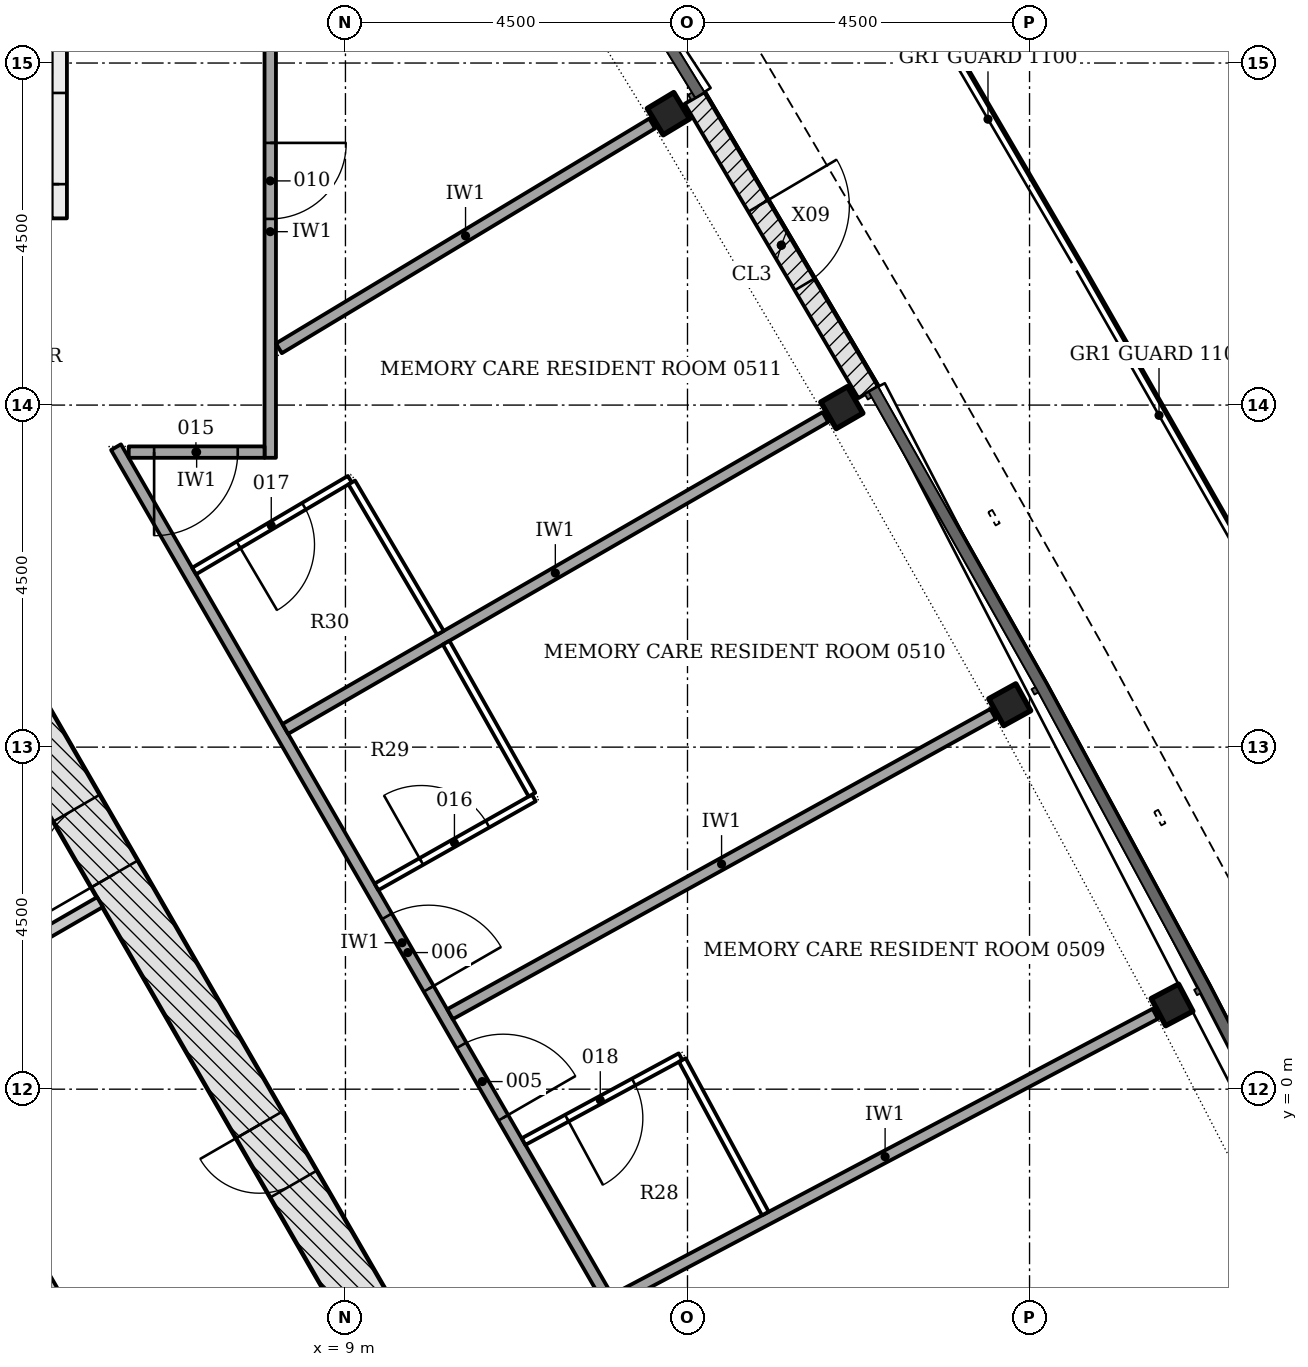
"""IFC4 building model, lengths in metres.
Left out: names, types, materials, properties, quantities, classifications, styles, units other than length and angle.
Written with IfcOpenShell. Run it as: python <this file> out.ifc"""

import sys

from ifc_helpers import new_model, si_unit, direction, frame, frame_2d, origin, origin_2d, place, context, subcontext, project, spatial, rectangle, i_section, extrude, element, fill, save


model = new_model("IFC4")
c1 = context("Model", 3, precision=1e-05, world=origin(), true_north=direction((0.0, 1.0)))
c2 = subcontext(c1, "Body", "Model", "MODEL_VIEW")
j1 = project(units=[si_unit("LENGTHUNIT", "METRE"), si_unit("PLANEANGLEUNIT", "RADIAN")], contexts=[c1])
p1 = place(None, origin())
s1 = spatial("IfcSite", under=j1, at=p1, CompositionType="ELEMENT")
p2 = place(p1, origin())
s2 = spatial("IfcBuilding", under=s1, at=p2, CompositionType="ELEMENT")
p3 = place(p2, frame((0.0, 0.0, 24.0)))
s3 = spatial("IfcBuildingStorey", under=s2, at=p3, CompositionType="ELEMENT", Elevation=24.0)
p4 = place(p3, frame((10.311, -4.703, -0.2), z_axis=(0.0, 0.0, 1.0), x_axis=(-0.500001446645, 0.866024568562, 0.0)))
e1 = element("IfcWall", 1, at=p4, inside=s3, PredefinedType="SHEAR", context=c2, shape_type="SweptSolid", body=[
    extrude(rectangle(XDim=18.458, YDim=0.7, at=frame_2d((9.229, 0.0))), origin(), (0.0, 0.0, 1.0), 3.6),
])
p5 = place(p4, frame((8.7, 0.0, 0.2)))
e2 = element("IfcOpeningElement", 2, at=p5, cuts=e1, PredefinedType="OPENING", context=c2, shape_type="SweptSolid", body=[
    extrude(rectangle(XDim=1.0, YDim=2.1, at=frame_2d((0.5, 1.05))), frame((0.0, 0.36, 0.0), z_axis=(0.0, -1.0, 0.0), x_axis=(1.0, 0.0, 0.0)), (0.0, 0.0, 1.0), 0.72),
])
p6 = place(p4, frame((3.99, 0.0, 0.2)))
e3 = element("IfcOpeningElement", 3, at=p6, cuts=e1, PredefinedType="OPENING", context=c2, shape_type="SweptSolid", body=[
    extrude(rectangle(XDim=0.9, YDim=2.1, at=frame_2d((0.45, 1.05))), frame((0.0, 0.36, 0.0), z_axis=(0.0, -1.0, 0.0), x_axis=(1.0, 0.0, 0.0)), (0.0, 0.0, 1.0), 0.72),
])
p7 = place(p4, frame((13.539, 0.0, 0.2)))
e4 = element("IfcOpeningElement", 4, at=p7, cuts=e1, PredefinedType="OPENING", context=c2, shape_type="SweptSolid", body=[
    extrude(rectangle(XDim=0.9, YDim=2.1, at=frame_2d((0.45, 1.05))), frame((0.0, 0.36, 0.0), z_axis=(0.0, -1.0, 0.0), x_axis=(1.0, 0.0, 0.0)), (0.0, 0.0, 1.0), 0.72),
])
for number, where, z_axis, x_axis in (
    (5, (19.875, 1.108, -0.2), (0.0, 0.0, 1.0), (-0.468, 0.884, 0.0)),
    (6, (17.739, 5.058, -0.2), (0.0, 0.0, 1.0), (-0.484, 0.875, 0.0)),
    (7, (15.531, 8.967, -0.2), (0.0, 0.0, 1.0), (-0.5, 0.866, 0.0)),
    (8, (13.25, 12.834, -0.2), (0.0, 0.0, 1.0), (-0.516, 0.857, 0.0)),
):
    element("IfcColumn", number, at=place(p3, frame(where, z_axis=z_axis, x_axis=x_axis)), inside=s3, PredefinedType="COLUMN", context=c2, shape_type="SweptSolid", body=[
        extrude(i_section(OverallWidth=0.404, OverallDepth=0.406, WebThickness=0.027, FlangeThickness=0.044, FilletRadius=0.015, at=origin_2d()), origin(), (0.0, 0.0, 1.0), 3.6),
    ])
p8 = place(p3, frame((13.593, 13.04, 0.0), z_axis=(0.0, 0.0, 1.0), x_axis=(0.507980887805, -0.861368340273, 0.0)))
e9 = element("IfcWall", 9, at=p8, inside=s3, PredefinedType="NOTDEFINED", context=c2, shape_type="SweptSolid", body=[
    extrude(rectangle(XDim=4.496, YDim=0.3, at=frame_2d((2.248, 0.0))), origin(), (0.0, 0.0, 1.0), 3.3),
])
p9 = place(p8, frame((1.648, 0.0, 0.0)))
e10 = element("IfcOpeningElement", 10, at=p9, cuts=e9, PredefinedType="OPENING", context=c2, shape_type="SweptSolid", body=[
    extrude(rectangle(XDim=1.2, YDim=2.4, at=frame_2d((0.6, 1.2))), frame((0.0, 0.16, 0.0), z_axis=(0.0, -1.0, 0.0), x_axis=(1.0, 0.0, 0.0)), (0.0, 0.0, 1.0), 0.32),
])
p10 = place(p3, frame((-4.404, -3.413, 0.0), z_axis=(0.0, 0.0, 1.0), x_axis=(0.866022252853, 0.500005457533, 0.0)))
e11 = element("IfcWall", 11, at=p10, inside=s3, PredefinedType="PARTITIONING", context=c2, shape_type="SweptSolid", body=[
    extrude(rectangle(XDim=11.749, YDim=0.15, at=frame_2d((5.875, 0.0))), origin(), (0.0, 0.0, 1.0), 3.4),
])
p11 = place(p10, frame((3.875, 0.0, 0.0)))
e12 = element("IfcOpeningElement", 12, at=p11, cuts=e11, PredefinedType="OPENING", context=c2, shape_type="SweptSolid", body=[
    extrude(rectangle(XDim=0.9, YDim=2.1, at=frame_2d((0.45, 1.05))), frame((0.0, 0.085, 0.0), z_axis=(0.0, -1.0, 0.0), x_axis=(1.0, 0.0, 0.0)), (0.0, 0.0, 1.0), 0.17),
])
p12 = place(p3, frame((5.598, -3.439, 0.0), z_axis=(0.0, 0.0, 1.0), x_axis=(-0.500007155043, 0.866021272779, 0.0)))
e13 = element("IfcWall", 13, at=p12, inside=s3, PredefinedType="PARTITIONING", context=c2, shape_type="SweptSolid", body=[
    extrude(rectangle(XDim=4.949, YDim=0.15, at=frame_2d((2.474, 0.0))), origin(), (0.0, 0.0, 1.0), 3.4),
])
p13 = place(p3, frame((5.236, 11.456, -0.2), z_axis=(0.0, 0.0, 1.0), x_axis=(0.0, 1.0, 0.0)))
e14 = element("IfcWall", 14, at=p13, inside=s3, PredefinedType="SHEAR", context=c2, shape_type="SweptSolid", body=[
    extrude(rectangle(XDim=5.6, YDim=0.2, at=frame_2d((2.8, 0.0))), origin(), (0.0, 0.0, 1.0), 3.6),
])
p14 = place(p13, frame((0.45, 0.0, 0.2)))
e15 = element("IfcOpeningElement", 15, at=p14, cuts=e14, PredefinedType="OPENING", context=c2, shape_type="SweptSolid", body=[
    extrude(rectangle(XDim=1.2, YDim=2.1, at=frame_2d((0.6, 1.05))), frame((0.0, 0.11, 0.0), z_axis=(0.0, -1.0, 0.0), x_axis=(1.0, 0.0, 0.0)), (0.0, 0.0, 1.0), 0.22),
])
p15 = place(p3, frame((5.981, 8.446, 0.0), z_axis=(0.0, 0.0, 1.0), x_axis=(0.499996620721, -0.866027354803, 0.0)))
e16 = element("IfcWall", 16, at=p15, inside=s3, PredefinedType="PARTITIONING", context=c2, shape_type="SweptSolid", body=[
    extrude(rectangle(XDim=15.057, YDim=0.15, at=frame_2d((7.528, 0.0))), origin(), (0.0, 0.0, 1.0), 2.768),
])
p16 = place(p15, frame((9.087, 0.0, 0.0)))
e17 = element("IfcOpeningElement", 17, at=p16, cuts=e16, PredefinedType="OPENING", context=c2, shape_type="SweptSolid", body=[
    extrude(rectangle(XDim=1.1, YDim=2.1, at=frame_2d((0.55, 1.05))), frame((0.0, 0.085, 0.0), z_axis=(0.0, -1.0, 0.0), x_axis=(1.0, 0.0, 0.0)), (0.0, 0.0, 1.0), 0.17),
])
p17 = place(p15, frame((7.128, 0.0, 0.0)))
e18 = element("IfcOpeningElement", 18, at=p17, cuts=e16, PredefinedType="OPENING", context=c2, shape_type="SweptSolid", body=[
    extrude(rectangle(XDim=1.1, YDim=2.1, at=frame_2d((0.55, 1.05))), frame((0.0, 0.085, 0.0), z_axis=(0.0, -1.0, 0.0), x_axis=(1.0, 0.0, 0.0)), (0.0, 0.0, 1.0), 0.17),
])
p18 = place(p3, frame((8.01, 14.256, 0.0), z_axis=(0.0, 0.0, 1.0), x_axis=(0.0, -1.0, 0.0)))
e19 = element("IfcWall", 19, at=p18, inside=s3, PredefinedType="PARTITIONING", context=c2, shape_type="SweptSolid", body=[
    extrude(rectangle(XDim=5.95, YDim=0.15, at=frame_2d((2.975, 0.0))), origin(), (0.0, 0.0, 1.0), 2.768),
])
p19 = place(p18, frame((1.807, 0.0, 0.0)))
e20 = element("IfcOpeningElement", 20, at=p19, cuts=e19, PredefinedType="OPENING", context=c2, shape_type="SweptSolid", body=[
    extrude(rectangle(XDim=1.0, YDim=2.1, at=frame_2d((0.5, 1.05))), frame((0.0, 0.085, 0.0), z_axis=(0.0, -1.0, 0.0), x_axis=(1.0, 0.0, 0.0)), (0.0, 0.0, 1.0), 0.17),
])
p20 = place(p3, frame((7.936, 8.381, 0.0), z_axis=(0.0, 0.0, 1.0), x_axis=(-1.0, 0.0, 0.0)))
e21 = element("IfcWall", 21, at=p20, inside=s3, PredefinedType="PARTITIONING", context=c2, shape_type="SweptSolid", body=[
    extrude(rectangle(XDim=1.787, YDim=0.15, at=frame_2d((0.894, 0.0))), origin(), (0.0, 0.0, 1.0), 2.768),
])
p21 = place(p20, frame((0.353, 0.0, 0.0)))
e22 = element("IfcOpeningElement", 22, at=p21, cuts=e21, PredefinedType="OPENING", context=c2, shape_type="SweptSolid", body=[
    extrude(rectangle(XDim=1.1, YDim=2.1, at=frame_2d((0.55, 1.05))), frame((0.0, 0.085, 0.0), z_axis=(0.0, -1.0, 0.0), x_axis=(1.0, 0.0, 0.0)), (0.0, 0.0, 1.0), 0.17),
])
p22 = place(p3, frame((15.314, 8.842, 0.0), z_axis=(0.0, 0.0, 1.0), x_axis=(-0.866015124653, -0.500017803555, 0.0)))
e23 = element("IfcWall", 23, at=p22, inside=s3, PredefinedType="PARTITIONING", context=c2, shape_type="SweptSolid", body=[
    extrude(rectangle(XDim=8.205, YDim=0.15, at=frame_2d((4.103, 0.0))), origin(), (0.0, 0.0, 1.0), 2.768),
])
p23 = place(p3, frame((17.521, 4.937, 0.0), z_axis=(0.0, 0.0, 1.0), x_axis=(-0.875148563779, -0.483854307944, 0.0)))
e24 = element("IfcWall", 24, at=p23, inside=s3, PredefinedType="PARTITIONING", context=c2, shape_type="SweptSolid", body=[
    extrude(rectangle(XDim=8.164, YDim=0.15, at=frame_2d((4.082, 0.0))), origin(), (0.0, 0.0, 1.0), 2.768),
])
p24 = place(p3, frame((19.654, 0.992, 0.0), z_axis=(0.0, 0.0, 1.0), x_axis=(-0.883980590433, -0.467523599124, 0.0)))
e25 = element("IfcWall", 25, at=p24, inside=s3, PredefinedType="PARTITIONING", context=c2, shape_type="SweptSolid", body=[
    extrude(rectangle(XDim=8.041, YDim=0.15, at=frame_2d((4.021, 0.0))), origin(), (0.0, 0.0, 1.0), 2.768),
])
p25 = place(p3, frame((13.036, 12.705, 0.0), z_axis=(0.0, 0.0, 1.0), x_axis=(-0.856612490534, -0.515960309579, 0.0)))
e26 = element("IfcWall", 26, at=p25, inside=s3, PredefinedType="PARTITIONING", context=c2, shape_type="SweptSolid", body=[
    extrude(rectangle(XDim=5.733, YDim=0.15, at=frame_2d((2.867, 0.0))), origin(), (0.0, 0.0, 1.0), 2.768),
])
p26 = place(p3, frame((9.408, 2.662, 0.0), z_axis=(0.0, 0.0, 1.0), x_axis=(0.870608725809, 0.491976062981, 0.0)))
e27 = element("IfcWall", 27, at=p26, inside=s3, PredefinedType="PARTITIONING", context=c2, shape_type="SweptSolid", body=[
    extrude(rectangle(XDim=2.378, YDim=0.1, at=frame_2d((1.189, 0.0))), origin(), (0.0, 0.0, 1.0), 3.4),
])
p27 = place(p26, frame((0.678, 0.0, 0.0)))
e28 = element("IfcOpeningElement", 28, at=p27, cuts=e27, PredefinedType="OPENING", context=c2, shape_type="SweptSolid", body=[
    extrude(rectangle(XDim=1.0, YDim=2.1, at=frame_2d((0.5, 1.05))), frame((0.0, 0.06, 0.0), z_axis=(0.0, -1.0, 0.0), x_axis=(1.0, 0.0, 0.0)), (0.0, 0.0, 1.0), 0.12),
])
p28 = place(p3, frame((9.058, 8.025, 0.0), z_axis=(0.0, 0.0, 1.0), x_axis=(-0.861363599661, -0.507988926236, 0.0)))
e29 = element("IfcWall", 29, at=p28, inside=s3, PredefinedType="PARTITIONING", context=c2, shape_type="SweptSolid", body=[
    extrude(rectangle(XDim=2.378, YDim=0.1, at=frame_2d((1.189, 0.0))), origin(), (0.0, 0.0, 1.0), 3.4),
])
p29 = place(p28, frame((0.7, 0.0, 0.0)))
e30 = element("IfcOpeningElement", 30, at=p29, cuts=e29, PredefinedType="OPENING", context=c2, shape_type="SweptSolid", body=[
    extrude(rectangle(XDim=1.0, YDim=2.1, at=frame_2d((0.5, 1.05))), frame((0.0, 0.06, 0.0), z_axis=(0.0, -1.0, 0.0), x_axis=(1.0, 0.0, 0.0)), (0.0, 0.0, 1.0), 0.12),
])
p30 = place(p3, frame((13.408, 0.427, 0.0), z_axis=(0.0, 0.0, 1.0), x_axis=(-0.879611235398, -0.475693256797, 0.0)))
e31 = element("IfcWall", 31, at=p30, inside=s3, PredefinedType="PARTITIONING", context=c2, shape_type="SweptSolid", body=[
    extrude(rectangle(XDim=2.347, YDim=0.1, at=frame_2d((1.173, 0.0))), origin(), (0.0, 0.0, 1.0), 3.4),
])
p31 = place(p30, frame((0.7, 0.0, 0.0)))
e32 = element("IfcOpeningElement", 32, at=p31, cuts=e31, PredefinedType="OPENING", context=c2, shape_type="SweptSolid", body=[
    extrude(rectangle(XDim=1.0, YDim=2.1, at=frame_2d((0.5, 1.05))), frame((0.0, 0.06, 0.0), z_axis=(0.0, -1.0, 0.0), x_axis=(1.0, 0.0, 0.0)), (0.0, 0.0, 1.0), 0.12),
])
for number, where, z_axis, x_axis in (
    (33, (14.524, -1.636, 0.0), (0.0, 0.0, 1.0), (-0.476, 0.88, 0.0)),
    (34, (10.325, 5.874, 0.0), (0.0, 0.0, 1.0), (0.492, -0.871, 0.0)),
    (35, (10.249, 6.004, 0.0), (0.0, 0.0, 1.0), (-0.508, 0.861, 0.0)),
):
    element("IfcWall", number, at=place(p3, frame(where, z_axis=z_axis, x_axis=x_axis)), inside=s3, PredefinedType="PARTITIONING", context=c2, shape_type="SweptSolid", body=[
        extrude(rectangle(XDim=2.296, YDim=0.1, at=frame_2d((1.148, 0.0))), origin(), (0.0, 0.0, 1.0), 2.768),
    ])
p32 = place(p9, origin())
e36 = element("IfcDoor", 36, at=p32, inside=s3, OperationType="SINGLE_SWING_LEFT", PredefinedType="DOOR", context=c2, shape_type="SweptSolid", body=[
    extrude(rectangle(XDim=1.2, YDim=2.4, at=frame_2d((0.6, 1.2))), frame((0.0, 0.025, 0.0), z_axis=(0.0, -1.0, 0.0), x_axis=(1.0, 0.0, 0.0)), (0.0, 0.0, 1.0), 0.05),
])
fill(e10, e36)
p33 = place(p5, origin())
e37 = element("IfcDoor", 37, at=p33, inside=s3, OperationType="SINGLE_SWING_LEFT", PredefinedType="DOOR", context=c2, shape_type="SweptSolid", body=[
    extrude(rectangle(XDim=1.0, YDim=2.1, at=frame_2d((0.5, 1.05))), frame((0.0, 0.075, 0.0), z_axis=(0.0, -1.0, 0.0), x_axis=(1.0, 0.0, 0.0)), (0.0, 0.0, 1.0), 0.15),
])
fill(e2, e37)
p34 = place(p6, origin())
e38 = element("IfcDoor", 38, at=p34, inside=s3, OperationType="SINGLE_SWING_RIGHT", PredefinedType="DOOR", context=c2, shape_type="SweptSolid", body=[
    extrude(rectangle(XDim=0.9, YDim=2.1, at=frame_2d((0.45, 1.05))), frame((0.0, 0.075, 0.0), z_axis=(0.0, -1.0, 0.0), x_axis=(1.0, 0.0, 0.0)), (0.0, 0.0, 1.0), 0.15),
])
fill(e3, e38)
p35 = place(p14, origin())
e39 = element("IfcDoor", 39, at=p35, inside=s3, OperationType="SINGLE_SWING_LEFT", PredefinedType="DOOR", context=c2, shape_type="SweptSolid", body=[
    extrude(rectangle(XDim=1.2, YDim=2.1, at=frame_2d((0.6, 1.05))), frame((0.0, 0.025, 0.0), z_axis=(0.0, -1.0, 0.0), x_axis=(1.0, 0.0, 0.0)), (0.0, 0.0, 1.0), 0.05),
])
fill(e15, e39)
p36 = place(p16, origin())
e40 = element("IfcDoor", 40, at=p36, inside=s3, OperationType="SINGLE_SWING_RIGHT", PredefinedType="DOOR", context=c2, shape_type="SweptSolid", body=[
    extrude(rectangle(XDim=1.1, YDim=2.1, at=frame_2d((0.55, 1.05))), frame((0.0, 0.025, 0.0), z_axis=(0.0, -1.0, 0.0), x_axis=(1.0, 0.0, 0.0)), (0.0, 0.0, 1.0), 0.05),
])
fill(e17, e40)
p37 = place(p17, origin())
e41 = element("IfcDoor", 41, at=p37, inside=s3, OperationType="SINGLE_SWING_RIGHT", PredefinedType="DOOR", context=c2, shape_type="SweptSolid", body=[
    extrude(rectangle(XDim=1.1, YDim=2.1, at=frame_2d((0.55, 1.05))), frame((0.0, 0.025, 0.0), z_axis=(0.0, -1.0, 0.0), x_axis=(1.0, 0.0, 0.0)), (0.0, 0.0, 1.0), 0.05),
])
fill(e18, e41)
p38 = place(p19, origin())
e42 = element("IfcDoor", 42, at=p38, inside=s3, OperationType="SINGLE_SWING_LEFT", PredefinedType="DOOR", context=c2, shape_type="SweptSolid", body=[
    extrude(rectangle(XDim=1.0, YDim=2.1, at=frame_2d((0.5, 1.05))), frame((0.0, 0.025, 0.0), z_axis=(0.0, -1.0, 0.0), x_axis=(1.0, 0.0, 0.0)), (0.0, 0.0, 1.0), 0.05),
])
fill(e20, e42)
p39 = place(p21, origin())
e43 = element("IfcDoor", 43, at=p39, inside=s3, OperationType="SINGLE_SWING_RIGHT", PredefinedType="DOOR", context=c2, shape_type="SweptSolid", body=[
    extrude(rectangle(XDim=1.1, YDim=2.1, at=frame_2d((0.55, 1.05))), frame((0.0, 0.025, 0.0), z_axis=(0.0, -1.0, 0.0), x_axis=(1.0, 0.0, 0.0)), (0.0, 0.0, 1.0), 0.05),
])
fill(e22, e43)
p40 = place(p27, origin())
e44 = element("IfcDoor", 44, at=p40, inside=s3, OperationType="SINGLE_SWING_LEFT", PredefinedType="DOOR", context=c2, shape_type="SweptSolid", body=[
    extrude(rectangle(XDim=1.0, YDim=2.1, at=frame_2d((0.5, 1.05))), frame((0.0, 0.025, 0.0), z_axis=(0.0, -1.0, 0.0), x_axis=(1.0, 0.0, 0.0)), (0.0, 0.0, 1.0), 0.05),
])
fill(e28, e44)
p41 = place(p29, origin())
e45 = element("IfcDoor", 45, at=p41, inside=s3, OperationType="SINGLE_SWING_RIGHT", PredefinedType="DOOR", context=c2, shape_type="SweptSolid", body=[
    extrude(rectangle(XDim=1.0, YDim=2.1, at=frame_2d((0.5, 1.05))), frame((0.0, 0.025, 0.0), z_axis=(0.0, -1.0, 0.0), x_axis=(1.0, 0.0, 0.0)), (0.0, 0.0, 1.0), 0.05),
])
fill(e30, e45)
p42 = place(p31, origin())
e46 = element("IfcDoor", 46, at=p42, inside=s3, OperationType="SINGLE_SWING_RIGHT", PredefinedType="DOOR", context=c2, shape_type="SweptSolid", body=[
    extrude(rectangle(XDim=1.0, YDim=2.1, at=frame_2d((0.5, 1.05))), frame((0.0, 0.025, 0.0), z_axis=(0.0, -1.0, 0.0), x_axis=(1.0, 0.0, 0.0)), (0.0, 0.0, 1.0), 0.05),
])
fill(e32, e46)
save(model, sys.argv[1])
